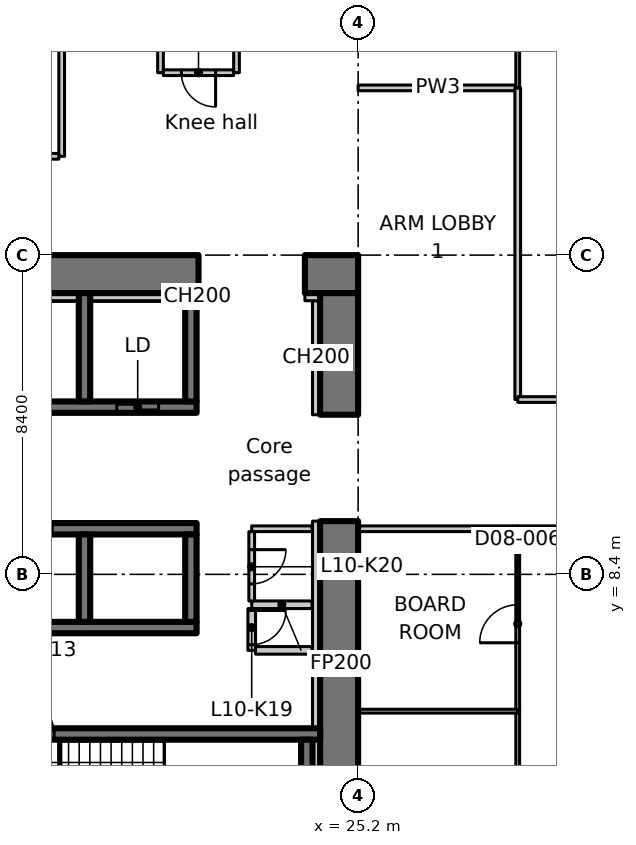
"""IFC4 building model, lengths in metres.
Left out: names, types, materials, properties, quantities, classifications, styles, units other than length and angle.
Written with IfcOpenShell. Run it as: python <this file> out.ifc"""

import sys

from ifc_helpers import new_model, si_unit, direction, frame, frame_2d, origin, place, context, subcontext, project, spatial, polyline, rectangle, outline, extrude, element, fill, save


model = new_model("IFC4")
c1 = context("Model", 3, precision=1e-05, world=origin(), true_north=direction((0.0, 1.0)))
c2 = subcontext(c1, "Body", "Model", "MODEL_VIEW")
j1 = project(units=[si_unit("LENGTHUNIT", "METRE"), si_unit("PLANEANGLEUNIT", "RADIAN")], contexts=[c1])
p1 = place(None, origin())
s1 = spatial("IfcSite", under=j1, at=p1, CompositionType="ELEMENT")
p2 = place(p1, origin())
s2 = spatial("IfcBuilding", under=s1, at=p2, CompositionType="ELEMENT")
p3 = place(p2, frame((0.0, 0.0, 50.9)))
s3 = spatial("IfcBuildingStorey", under=s2, at=p3, CompositionType="ELEMENT", Elevation=50.9)
p4 = place(p3, frame((-1.1, 16.3, 0.0), z_axis=(0.0, 0.0, 1.0), x_axis=(1.0, 0.0, 0.0)))
e1 = element("IfcWall", 1, at=p4, inside=s3, PredefinedType="SHEAR", context=c2, shape_type="SweptSolid", body=[
    extrude(rectangle(XDim=22.1, YDim=1.0, at=frame_2d((11.05, 0.0))), origin(), (0.0, 0.0, 1.0), 3.35),
])
p5 = place(p4, frame((3.15, 0.0, 0.0)))
e2 = element("IfcOpeningElement", 2, at=p5, cuts=e1, PredefinedType="OPENING", context=c2, shape_type="SweptSolid", body=[
    extrude(rectangle(XDim=1.1, YDim=2.3, at=frame_2d((0.55, 1.15))), frame((0.0, 0.51, 0.0), z_axis=(0.0, -1.0, 0.0), x_axis=(1.0, 0.0, 0.0)), (0.0, 0.0, 1.0), 1.02),
])
p6 = place(p3, frame((23.8, 16.3, 0.0), z_axis=(0.0, 0.0, 1.0), x_axis=(1.0, 0.0, 0.0)))
e3 = element("IfcWall", 3, at=p6, inside=s3, PredefinedType="SHEAR", context=c2, shape_type="SweptSolid", body=[
    extrude(rectangle(XDim=1.4, YDim=1.0, at=frame_2d((0.7, 0.0))), origin(), (0.0, 0.0, 1.0), 3.35),
])
p7 = place(p3, frame((24.7, 1.0, 0.0), z_axis=(0.0, 0.0, 1.0), x_axis=(0.0, 1.0, 0.0)))
e4 = element("IfcWall", 4, at=p7, inside=s3, PredefinedType="SHEAR", context=c2, shape_type="SweptSolid", body=[
    extrude(rectangle(XDim=8.8, YDim=1.0, at=frame_2d((4.4, 0.0))), origin(), (0.0, 0.0, 1.0), 3.35),
])
p8 = place(p3, frame((24.7, 12.6, 0.0), z_axis=(0.0, 0.0, 1.0), x_axis=(0.0, 1.0, 0.0)))
e5 = element("IfcWall", 5, at=p8, inside=s3, PredefinedType="SHEAR", context=c2, shape_type="SweptSolid", body=[
    extrude(rectangle(XDim=3.2, YDim=1.0, at=frame_2d((1.6, 0.0))), origin(), (0.0, 0.0, 1.0), 3.35),
])
p9 = place(p3, frame((24.1, 12.6, 0.0), z_axis=(0.0, 0.0, 1.0), x_axis=(0.0, 1.0, 0.0)))
e6 = element("IfcWall", 6, at=p9, inside=s3, PredefinedType="PARTITIONING", context=c2, shape_type="SweptSolid", body=[
    extrude(rectangle(XDim=3.0, YDim=0.2, at=frame_2d((1.5, 0.0))), origin(), (0.0, 0.0, 1.0), 3.35),
])
p10 = place(p3, frame((23.8, 15.7, 0.0), z_axis=(0.0, 0.0, 1.0), x_axis=(1.0, 0.0, 0.0)))
e7 = element("IfcWall", 7, at=p10, inside=s3, PredefinedType="PARTITIONING", context=c2, shape_type="SweptSolid", body=[
    extrude(rectangle(XDim=0.4, YDim=0.2, at=frame_2d((0.2, 0.0))), origin(), (0.0, 0.0, 1.0), 3.35),
])
p11 = place(p3, frame((1.0, 7.0, 0.0), z_axis=(0.0, 0.0, 1.0), x_axis=(1.0, 0.0, 0.0)))
e8 = element("IfcWall", 8, at=p11, inside=s3, PredefinedType="SHEAR", context=c2, shape_type="SweptSolid", body=[
    extrude(rectangle(XDim=19.95, YDim=0.3, at=frame_2d((9.975, 0.0))), origin(), (0.0, 0.0, 1.0), 3.35),
])
p12 = place(p3, frame((1.0, 9.6, 0.0), z_axis=(0.0, 0.0, 1.0), x_axis=(1.0, 0.0, 0.0)))
e9 = element("IfcWall", 9, at=p12, inside=s3, PredefinedType="SHEAR", context=c2, shape_type="SweptSolid", body=[
    extrude(rectangle(XDim=19.95, YDim=0.3, at=frame_2d((9.975, 0.0))), origin(), (0.0, 0.0, 1.0), 3.35),
])
p13 = place(p12, frame((1.05, 0.0, 0.0)))
e10 = element("IfcOpeningElement", 10, at=p13, cuts=e9, PredefinedType="OPENING", context=c2, shape_type="SweptSolid", body=[
    extrude(rectangle(XDim=1.1, YDim=2.3, at=frame_2d((0.55, 1.15))), frame((0.0, 0.16, 0.0), z_axis=(0.0, -1.0, 0.0), x_axis=(1.0, 0.0, 0.0)), (0.0, 0.0, 1.0), 0.32),
])
p14 = place(p12, frame((3.85, 0.0, 0.0)))
e11 = element("IfcOpeningElement", 11, at=p14, cuts=e9, PredefinedType="OPENING", context=c2, shape_type="SweptSolid", body=[
    extrude(rectangle(XDim=1.1, YDim=2.3, at=frame_2d((0.55, 1.15))), frame((0.0, 0.16, 0.0), z_axis=(0.0, -1.0, 0.0), x_axis=(1.0, 0.0, 0.0)), (0.0, 0.0, 1.0), 0.32),
])
p15 = place(p12, frame((6.65, 0.0, 0.0)))
e12 = element("IfcOpeningElement", 12, at=p15, cuts=e9, PredefinedType="OPENING", context=c2, shape_type="SweptSolid", body=[
    extrude(rectangle(XDim=1.1, YDim=2.3, at=frame_2d((0.55, 1.15))), frame((0.0, 0.16, 0.0), z_axis=(0.0, -1.0, 0.0), x_axis=(1.0, 0.0, 0.0)), (0.0, 0.0, 1.0), 0.32),
])
p16 = place(p12, frame((9.45, 0.0, 0.0)))
e13 = element("IfcOpeningElement", 13, at=p16, cuts=e9, PredefinedType="OPENING", context=c2, shape_type="SweptSolid", body=[
    extrude(rectangle(XDim=1.1, YDim=2.3, at=frame_2d((0.55, 1.15))), frame((0.0, 0.16, 0.0), z_axis=(0.0, -1.0, 0.0), x_axis=(1.0, 0.0, 0.0)), (0.0, 0.0, 1.0), 0.32),
])
p17 = place(p12, frame((12.25, 0.0, 0.0)))
e14 = element("IfcOpeningElement", 14, at=p17, cuts=e9, PredefinedType="OPENING", context=c2, shape_type="SweptSolid", body=[
    extrude(rectangle(XDim=1.1, YDim=2.3, at=frame_2d((0.55, 1.15))), frame((0.0, 0.16, 0.0), z_axis=(0.0, -1.0, 0.0), x_axis=(1.0, 0.0, 0.0)), (0.0, 0.0, 1.0), 0.32),
])
p18 = place(p12, frame((15.05, 0.0, 0.0)))
e15 = element("IfcOpeningElement", 15, at=p18, cuts=e9, PredefinedType="OPENING", context=c2, shape_type="SweptSolid", body=[
    extrude(rectangle(XDim=1.1, YDim=2.3, at=frame_2d((0.55, 1.15))), frame((0.0, 0.16, 0.0), z_axis=(0.0, -1.0, 0.0), x_axis=(1.0, 0.0, 0.0)), (0.0, 0.0, 1.0), 0.32),
])
for number, where, z_axis, x_axis in (
    (16, (18.0, 7.15, 0.0), (0.0, 0.0, 1.0), (0.0, 1.0, 0.0)),
    (17, (20.8, 7.15, 0.0), (0.0, 0.0, 1.0), (0.0, 1.0, 0.0)),
):
    element("IfcWall", number, at=place(p3, frame(where, z_axis=z_axis, x_axis=x_axis)), inside=s3, PredefinedType="SHEAR", context=c2, shape_type="SweptSolid", body=[
        extrude(rectangle(XDim=2.3, YDim=0.3, at=frame_2d((1.15, 0.0))), origin(), (0.0, 0.0, 1.0), 3.35),
    ])
p19 = place(p3, frame((15.05, 12.8, 0.0), z_axis=(0.0, 0.0, 1.0), x_axis=(1.0, 0.0, 0.0)))
e18 = element("IfcWall", 18, at=p19, inside=s3, PredefinedType="SHEAR", context=c2, shape_type="SweptSolid", body=[
    extrude(rectangle(XDim=5.9, YDim=0.3, at=frame_2d((2.95, 0.0))), origin(), (0.0, 0.0, 1.0), 3.35),
])
p20 = place(p19, frame((3.8, 0.0, 0.0)))
e19 = element("IfcOpeningElement", 19, at=p20, cuts=e18, PredefinedType="OPENING", context=c2, shape_type="SweptSolid", body=[
    extrude(rectangle(XDim=1.1, YDim=2.3, at=frame_2d((0.55, 1.15))), frame((0.0, 0.16, 0.0), z_axis=(0.0, -1.0, 0.0), x_axis=(1.0, 0.0, 0.0)), (0.0, 0.0, 1.0), 0.32),
])
for number, where, z_axis, x_axis in (
    (20, (18.0, 12.95, 0.0), (0.0, 0.0, 1.0), (0.0, 1.0, 0.0)),
    (21, (20.8, 12.95, 0.0), (0.0, 0.0, 1.0), (0.0, 1.0, 0.0)),
):
    element("IfcWall", number, at=place(p3, frame(where, z_axis=z_axis, x_axis=x_axis)), inside=s3, PredefinedType="SHEAR", context=c2, shape_type="SweptSolid", body=[
        extrude(rectangle(XDim=2.85, YDim=0.3, at=frame_2d((1.425, 0.0))), origin(), (0.0, 0.0, 1.0), 3.35),
    ])
p21 = place(p3, frame((15.8, 4.2, 0.0), z_axis=(0.0, 0.0, 1.0), x_axis=(1.0, 0.0, 0.0)))
e22 = element("IfcWall", 22, at=p21, inside=s3, PredefinedType="SHEAR", context=c2, shape_type="SweptSolid", body=[
    extrude(rectangle(XDim=8.4, YDim=0.3, at=frame_2d((4.2, 0.0))), origin(), (0.0, 0.0, 1.0), 3.35),
])
p22 = place(p21, frame((0.4, 0.0, 0.0)))
e23 = element("IfcOpeningElement", 23, at=p22, cuts=e22, PredefinedType="OPENING", context=c2, shape_type="SweptSolid", body=[
    extrude(rectangle(XDim=1.0, YDim=2.1, at=frame_2d((0.5, 1.05))), frame((0.0, 0.16, 0.0), z_axis=(0.0, -1.0, 0.0), x_axis=(1.0, 0.0, 0.0)), (0.0, 0.0, 1.0), 0.32),
])
p23 = place(p3, frame((23.85, 1.5, 0.0), z_axis=(0.0, 0.0, 1.0), x_axis=(0.0, 1.0, 0.0)))
e24 = element("IfcWall", 24, at=p23, inside=s3, PredefinedType="SHEAR", context=c2, shape_type="SweptSolid", body=[
    extrude(rectangle(XDim=2.55, YDim=0.3, at=frame_2d((1.275, 0.0))), origin(), (0.0, 0.0, 1.0), 3.35),
])
p24 = place(p3, frame((23.988, 7.6, 0.0), z_axis=(0.0, 0.0, 1.0), x_axis=(-1.0, 0.0, 0.0)))
e25 = element("IfcWall", 25, at=p24, inside=s3, PredefinedType="PARTITIONING", context=c2, shape_type="SweptSolid", body=[
    extrude(rectangle(XDim=1.588, YDim=0.2, at=frame_2d((0.794, 0.0))), origin(), (0.0, 0.0, 1.0), 3.35),
])
p25 = place(p3, frame((22.4, 7.5, 0.0), z_axis=(0.0, 0.0, 1.0), x_axis=(0.0, -1.0, 0.0)))
e26 = element("IfcWall", 26, at=p25, inside=s3, PredefinedType="PARTITIONING", context=c2, shape_type="SweptSolid", body=[
    extrude(rectangle(XDim=1.1, YDim=0.2, at=frame_2d((0.55, 0.0))), origin(), (0.0, 0.0, 1.0), 3.35),
])
p26 = place(p25, frame((0.05, 0.0, 0.0)))
e27 = element("IfcOpeningElement", 27, at=p26, cuts=e26, PredefinedType="OPENING", context=c2, shape_type="SweptSolid", body=[
    extrude(rectangle(XDim=0.9, YDim=2.1, at=frame_2d((0.45, 1.05))), frame((0.0, 0.11, 0.0), z_axis=(0.0, -1.0, 0.0), x_axis=(1.0, 0.0, 0.0)), (0.0, 0.0, 1.0), 0.22),
])
p27 = place(p3, frame((22.5, 6.4, 0.0), z_axis=(0.0, 0.0, 1.0), x_axis=(1.0, 0.0, 0.0)))
e28 = element("IfcWall", 28, at=p27, inside=s3, PredefinedType="PARTITIONING", context=c2, shape_type="SweptSolid", body=[
    extrude(rectangle(XDim=1.488, YDim=0.2, at=frame_2d((0.744, 0.0))), origin(), (0.0, 0.0, 1.0), 3.35),
])
p28 = place(p3, frame((17.4, 23.825, 0.0), z_axis=(0.0, 0.0, 1.0), x_axis=(0.0, -1.0, 0.0)))
e29 = element("IfcWall", 29, at=p28, inside=s3, PredefinedType="PARTITIONING", context=c2, shape_type="SweptSolid", body=[
    extrude(rectangle(XDim=4.425, YDim=0.15, at=frame_2d((2.212, 0.0))), origin(), (0.0, 0.0, 1.0), 3.35),
])
p29 = place(p3, frame((17.325, 19.4, 0.0), z_axis=(0.0, 0.0, 1.0), x_axis=(-1.0, 0.0, 0.0)))
e30 = element("IfcWall", 30, at=p29, inside=s3, PredefinedType="PARTITIONING", context=c2, shape_type="SweptSolid", body=[
    extrude(rectangle(XDim=4.425, YDim=0.15, at=frame_2d((2.212, 0.0))), origin(), (0.0, 0.0, 1.0), 3.35),
])
p30 = place(p29, frame((1.675, 0.0, 0.0)))
e31 = element("IfcOpeningElement", 31, at=p30, cuts=e30, PredefinedType="OPENING", context=c2, shape_type="SweptSolid", body=[
    extrude(rectangle(XDim=1.0, YDim=2.1, at=frame_2d((0.5, 1.05))), frame((0.0, 0.085, 0.0), z_axis=(0.0, -1.0, 0.0), x_axis=(1.0, 0.0, 0.0)), (0.0, 0.0, 1.0), 0.17),
])
p31 = place(p3, frame((23.988, 9.6, 0.0), z_axis=(0.0, 0.0, 1.0), x_axis=(-1.0, 0.0, 0.0)))
e32 = element("IfcWall", 32, at=p31, inside=s3, PredefinedType="PARTITIONING", context=c2, shape_type="SweptSolid", body=[
    extrude(rectangle(XDim=1.588, YDim=0.15, at=frame_2d((0.794, 0.0))), origin(), (0.0, 0.0, 1.0), 3.35),
])
p32 = place(p3, frame((22.4, 9.525, 0.0), z_axis=(0.0, 0.0, 1.0), x_axis=(0.0, -1.0, 0.0)))
e33 = element("IfcWall", 33, at=p32, inside=s3, PredefinedType="PARTITIONING", context=c2, shape_type="SweptSolid", body=[
    extrude(rectangle(XDim=1.825, YDim=0.15, at=frame_2d((0.913, 0.0))), origin(), (0.0, 0.0, 1.0), 3.35),
])
p33 = place(p32, frame((0.475, 0.0, 0.0)))
e34 = element("IfcOpeningElement", 34, at=p33, cuts=e33, PredefinedType="OPENING", context=c2, shape_type="SweptSolid", body=[
    extrude(rectangle(XDim=0.9, YDim=2.1, at=frame_2d((0.45, 1.05))), frame((0.0, 0.085, 0.0), z_axis=(0.0, -1.0, 0.0), x_axis=(1.0, 0.0, 0.0)), (0.0, 0.0, 1.0), 0.17),
])
p34 = place(p3, frame((20.0, 21.6, 0.0), z_axis=(0.0, 0.0, 1.0), x_axis=(0.0, 1.0, 0.0)))
e35 = element("IfcWall", 35, at=p34, inside=s3, PredefinedType="PARTITIONING", context=c2, shape_type="SweptSolid", body=[
    extrude(rectangle(XDim=2.4, YDim=0.15, at=frame_2d((1.2, 0.0))), origin(), (0.0, 0.0, 1.0), 3.35),
])
p35 = place(p3, frame((22.0, 23.925, 0.0), z_axis=(0.0, 0.0, 1.0), x_axis=(0.0, -1.0, 0.0)))
e36 = element("IfcWall", 36, at=p35, inside=s3, PredefinedType="PARTITIONING", context=c2, shape_type="SweptSolid", body=[
    extrude(rectangle(XDim=2.325, YDim=0.15, at=frame_2d((1.163, 0.0))), origin(), (0.0, 0.0, 1.0), 3.35),
])
p36 = place(p3, frame((21.925, 21.6, 0.0), z_axis=(0.0, 0.0, 1.0), x_axis=(-1.0, 0.0, 0.0)))
e37 = element("IfcWall", 37, at=p36, inside=s3, PredefinedType="PARTITIONING", context=c2, shape_type="SweptSolid", body=[
    extrude(rectangle(XDim=1.85, YDim=0.15, at=frame_2d((0.925, 0.0))), origin(), (0.0, 0.0, 1.0), 3.35),
])
p37 = place(p36, frame((0.475, 0.0, 0.0)))
e38 = element("IfcOpeningElement", 38, at=p37, cuts=e37, PredefinedType="OPENING", context=c2, shape_type="SweptSolid", body=[
    extrude(rectangle(XDim=0.9, YDim=2.1, at=frame_2d((0.45, 1.05))), frame((0.0, 0.085, 0.0), z_axis=(0.0, -1.0, 0.0), x_axis=(1.0, 0.0, 0.0)), (0.0, 0.0, 1.0), 0.17),
])
for number, where, z_axis, x_axis in (
    (39, (15.35, 15.7, 0.0), (0.0, 0.0, 1.0), (1.0, 0.0, 0.0)),
    (40, (18.15, 15.7, 0.0), (0.0, 0.0, 1.0), (1.0, 0.0, 0.0)),
):
    element("IfcWall", number, at=place(p3, frame(where, z_axis=z_axis, x_axis=x_axis)), inside=s3, PredefinedType="PARTITIONING", context=c2, shape_type="SweptSolid", body=[
        extrude(rectangle(XDim=2.5, YDim=0.2, at=frame_2d((1.25, 0.0))), origin(), (0.0, 0.0, 1.0), 3.35),
    ])
p38 = place(p3, frame((20.95, 15.7, 0.0), z_axis=(0.0, 0.0, 1.0), x_axis=(1.0, 0.0, 0.0)))
e41 = element("IfcWall", 41, at=p38, inside=s3, PredefinedType="PARTITIONING", context=c2, shape_type="SweptSolid", body=[
    extrude(rectangle(XDim=0.05, YDim=0.2, at=frame_2d((0.025, 0.0))), origin(), (0.0, 0.0, 1.0), 3.35),
])
p39 = place(p3, frame((24.1, 1.5, 0.0), z_axis=(0.0, 0.0, 1.0), x_axis=(0.0, 1.0, 0.0)))
e42 = element("IfcWall", 42, at=p39, inside=s3, PredefinedType="PARTITIONING", context=c2, shape_type="SweptSolid", body=[
    extrude(rectangle(XDim=2.55, YDim=0.2, at=frame_2d((1.275, 0.0))), origin(), (0.0, 0.0, 1.0), 3.35),
])
p40 = place(p3, frame((24.1, 4.35, 0.0), z_axis=(0.0, 0.0, 1.0), x_axis=(0.0, 1.0, 0.0)))
e43 = element("IfcWall", 43, at=p40, inside=s3, PredefinedType="PARTITIONING", context=c2, shape_type="SweptSolid", body=[
    extrude(rectangle(XDim=5.45, YDim=0.2, at=frame_2d((2.725, 0.0))), origin(), (0.0, 0.0, 1.0), 3.35),
])
for number, where, z_axis, x_axis in (
    (44, (25.2, 21.2, 0.0), (0.0, 0.0, 1.0), (1.0, 0.0, 0.0)),
    (45, (29.4, 9.6, 0.0), (0.0, 0.0, 1.0), (-1.0, 0.0, 0.0)),
):
    element("IfcWall", number, at=place(p3, frame(where, z_axis=z_axis, x_axis=x_axis)), inside=s3, PredefinedType="PARTITIONING", context=c2, shape_type="SweptSolid", body=[
        extrude(rectangle(XDim=4.2, YDim=0.15, at=frame_2d((2.1, 0.0))), origin(), (0.0, 0.0, 1.0), 3.33),
    ])
p41 = place(p3, frame((29.4, 21.2, 0.0), z_axis=(0.0, 0.0, 1.0), x_axis=(0.0, -1.0, 0.0)))
e46 = element("IfcWall", 46, at=p41, inside=s3, PredefinedType="PARTITIONING", context=c2, shape_type="SweptSolid", body=[
    extrude(rectangle(XDim=8.2, YDim=0.15, at=frame_2d((4.1, 0.0))), origin(), (0.0, 0.0, 1.0), 3.33),
])
p42 = place(p3, frame((29.4, 27.429, 0.0), z_axis=(0.0, 0.0, 1.0), x_axis=(0.0, -1.0, 0.0)))
e47 = element("IfcWall", 47, at=p42, inside=s3, PredefinedType="PARTITIONING", context=c2, shape_type="SweptSolid", body=[
    extrude(outline(polyline([(0.0, 0.0), (6.229, 0.0), (6.229, 3.33), (2.679, 3.33), (2.677, 2.98), (1.781, 2.98), (1.779, 3.33), (0.154, 3.33), (0.0, 3.33), (0.0, 0.0)])), frame((0.0, 0.05, 0.0), z_axis=(0.0, -1.0, 0.0), x_axis=(1.0, 0.0, 0.0)), (0.0, 0.0, 1.0), 0.1),
])
p43 = place(p3, frame((37.8, 9.6, 0.0), z_axis=(0.0, 0.0, 1.0), x_axis=(-1.0, 0.0, 0.0)))
e48 = element("IfcWall", 48, at=p43, inside=s3, PredefinedType="PARTITIONING", context=c2, shape_type="SweptSolid", body=[
    extrude(rectangle(XDim=8.4, YDim=0.15, at=frame_2d((4.2, 0.0))), origin(), (0.0, 0.0, 1.0), 3.33),
])
p44 = place(p43, frame((1.8, 0.0, 0.0)))
e49 = element("IfcOpeningElement", 49, at=p44, cuts=e48, PredefinedType="OPENING", context=c2, shape_type="SweptSolid", body=[
    extrude(rectangle(XDim=1.6, YDim=2.1, at=frame_2d((0.8, 1.05))), frame((0.0, 0.085, 0.0), z_axis=(0.0, -1.0, 0.0), x_axis=(1.0, 0.0, 0.0)), (0.0, 0.0, 1.0), 0.17),
])
p45 = place(p3, frame((29.4, 13.0, 0.0), z_axis=(0.0, 0.0, 1.0), x_axis=(1.0, 0.0, 0.0)))
e50 = element("IfcWall", 50, at=p45, inside=s3, PredefinedType="PARTITIONING", context=c2, shape_type="SweptSolid", body=[
    extrude(rectangle(XDim=8.4, YDim=0.15, at=frame_2d((4.2, 0.0))), origin(), (0.0, 0.0, 1.0), 3.33),
])
p46 = place(p45, frame((3.3, 0.0, 0.0)))
e51 = element("IfcOpeningElement", 51, at=p46, cuts=e50, PredefinedType="OPENING", context=c2, shape_type="SweptSolid", body=[
    extrude(rectangle(XDim=1.8, YDim=2.1, at=frame_2d((0.9, 1.05))), frame((0.0, 0.085, 0.0), z_axis=(0.0, -1.0, 0.0), x_axis=(1.0, 0.0, 0.0)), (0.0, 0.0, 1.0), 0.17),
])
p47 = place(p3, frame((29.4, -1.365, 0.0), z_axis=(0.0, 0.0, 1.0), x_axis=(0.0, 1.0, 0.0)))
e52 = element("IfcWall", 52, at=p47, inside=s3, PredefinedType="PARTITIONING", context=c2, shape_type="SweptSolid", body=[
    extrude(outline(polyline([(0.0, 0.0), (6.165, 0.0), (6.165, 3.33), (1.815, 3.33), (1.813, 2.98), (0.917, 2.98), (0.915, 3.33), (0.265, 3.33), (0.0, 3.33), (0.0, 0.0)])), frame((0.0, 0.05, 0.0), z_axis=(0.0, -1.0, 0.0), x_axis=(1.0, 0.0, 0.0)), (0.0, 0.0, 1.0), 0.1),
])
p48 = place(p47, frame((2.865, 0.0, 0.0)))
e53 = element("IfcOpeningElement", 53, at=p48, cuts=e52, PredefinedType="OPENING", context=c2, shape_type="SweptSolid", body=[
    extrude(rectangle(XDim=1.0, YDim=2.1, at=frame_2d((0.5, 1.05))), frame((0.0, 0.06, 0.0), z_axis=(0.0, -1.0, 0.0), x_axis=(1.0, 0.0, 0.0)), (0.0, 0.0, 1.0), 0.12),
])
p49 = place(p3, frame((29.4, 4.8, 0.0), z_axis=(0.0, 0.0, 1.0), x_axis=(0.0, 1.0, 0.0)))
e54 = element("IfcWall", 54, at=p49, inside=s3, PredefinedType="PARTITIONING", context=c2, shape_type="SweptSolid", body=[
    extrude(rectangle(XDim=4.8, YDim=0.1, at=frame_2d((2.4, 0.0))), origin(), (0.0, 0.0, 1.0), 3.33),
])
p50 = place(p49, frame((1.8, 0.0, 0.0)))
e55 = element("IfcOpeningElement", 55, at=p50, cuts=e54, PredefinedType="OPENING", context=c2, shape_type="SweptSolid", body=[
    extrude(rectangle(XDim=1.0, YDim=2.1, at=frame_2d((0.5, 1.05))), frame((0.0, 0.06, 0.0), z_axis=(0.0, -1.0, 0.0), x_axis=(1.0, 0.0, 0.0)), (0.0, 0.0, 1.0), 0.12),
])
p51 = place(p3, frame((25.2, 4.8, 0.0), z_axis=(0.0, 0.0, 1.0), x_axis=(1.0, 0.0, 0.0)))
e56 = element("IfcWall", 56, at=p51, inside=s3, PredefinedType="PARTITIONING", context=c2, shape_type="SweptSolid", body=[
    extrude(rectangle(XDim=4.2, YDim=0.1, at=frame_2d((2.1, 0.0))), origin(), (0.0, 0.0, 1.0), 3.33),
])
p52 = place(p18, origin())
e57 = element("IfcDoor", 57, at=p52, inside=s3, OperationType="SLIDING_TO_LEFT", PredefinedType="DOOR", context=c2, shape_type="SweptSolid", body=[
    extrude(rectangle(XDim=1.1, YDim=2.3, at=frame_2d((0.55, 1.15))), frame((0.0, 0.025, 0.0), z_axis=(0.0, -1.0, 0.0), x_axis=(1.0, 0.0, 0.0)), (0.0, 0.0, 1.0), 0.05),
])
fill(e15, e57)
p53 = place(p20, origin())
e58 = element("IfcDoor", 58, at=p53, inside=s3, OperationType="SLIDING_TO_LEFT", PredefinedType="DOOR", context=c2, shape_type="SweptSolid", body=[
    extrude(rectangle(XDim=1.1, YDim=2.3, at=frame_2d((0.55, 1.15))), frame((0.0, 0.025, 0.0), z_axis=(0.0, -1.0, 0.0), x_axis=(1.0, 0.0, 0.0)), (0.0, 0.0, 1.0), 0.05),
])
fill(e19, e58)
p54 = place(p22, origin())
e59 = element("IfcDoor", 59, at=p54, inside=s3, OperationType="SINGLE_SWING_LEFT", PredefinedType="DOOR", context=c2, shape_type="SweptSolid", body=[
    extrude(rectangle(XDim=1.0, YDim=2.1, at=frame_2d((0.5, 1.05))), frame((0.0, 0.025, 0.0), z_axis=(0.0, -1.0, 0.0), x_axis=(1.0, 0.0, 0.0)), (0.0, 0.0, 1.0), 0.05),
])
fill(e23, e59)
p55 = place(p26, origin())
e60 = element("IfcDoor", 60, at=p55, inside=s3, OperationType="SINGLE_SWING_LEFT", PredefinedType="DOOR", context=c2, shape_type="SweptSolid", body=[
    extrude(rectangle(XDim=0.9, YDim=2.1, at=frame_2d((0.45, 1.05))), frame((0.0, 0.025, 0.0), z_axis=(0.0, -1.0, 0.0), x_axis=(1.0, 0.0, 0.0)), (0.0, 0.0, 1.0), 0.05),
])
fill(e27, e60)
p56 = place(p33, origin())
e61 = element("IfcDoor", 61, at=p56, inside=s3, OperationType="SINGLE_SWING_RIGHT", PredefinedType="DOOR", context=c2, shape_type="SweptSolid", body=[
    extrude(rectangle(XDim=0.9, YDim=2.1, at=frame_2d((0.45, 1.05))), frame((0.0, 0.025, 0.0), z_axis=(0.0, -1.0, 0.0), x_axis=(1.0, 0.0, 0.0)), (0.0, 0.0, 1.0), 0.05),
])
fill(e34, e61)
p57 = place(p37, origin())
e62 = element("IfcDoor", 62, at=p57, inside=s3, OperationType="SINGLE_SWING_RIGHT", PredefinedType="DOOR", context=c2, shape_type="SweptSolid", body=[
    extrude(rectangle(XDim=0.9, YDim=2.1, at=frame_2d((0.45, 1.05))), frame((0.0, 0.025, 0.0), z_axis=(0.0, -1.0, 0.0), x_axis=(1.0, 0.0, 0.0)), (0.0, 0.0, 1.0), 0.05),
])
fill(e38, e62)
p58 = place(p50, origin())
e63 = element("IfcDoor", 63, at=p58, inside=s3, OperationType="SINGLE_SWING_LEFT", PredefinedType="DOOR", context=c2, shape_type="SweptSolid", body=[
    extrude(rectangle(XDim=1.0, YDim=2.1, at=frame_2d((0.5, 1.05))), frame((0.0, 0.025, 0.0), z_axis=(0.0, -1.0, 0.0), x_axis=(1.0, 0.0, 0.0)), (0.0, 0.0, 1.0), 0.05),
])
fill(e55, e63)
save(model, sys.argv[1])
